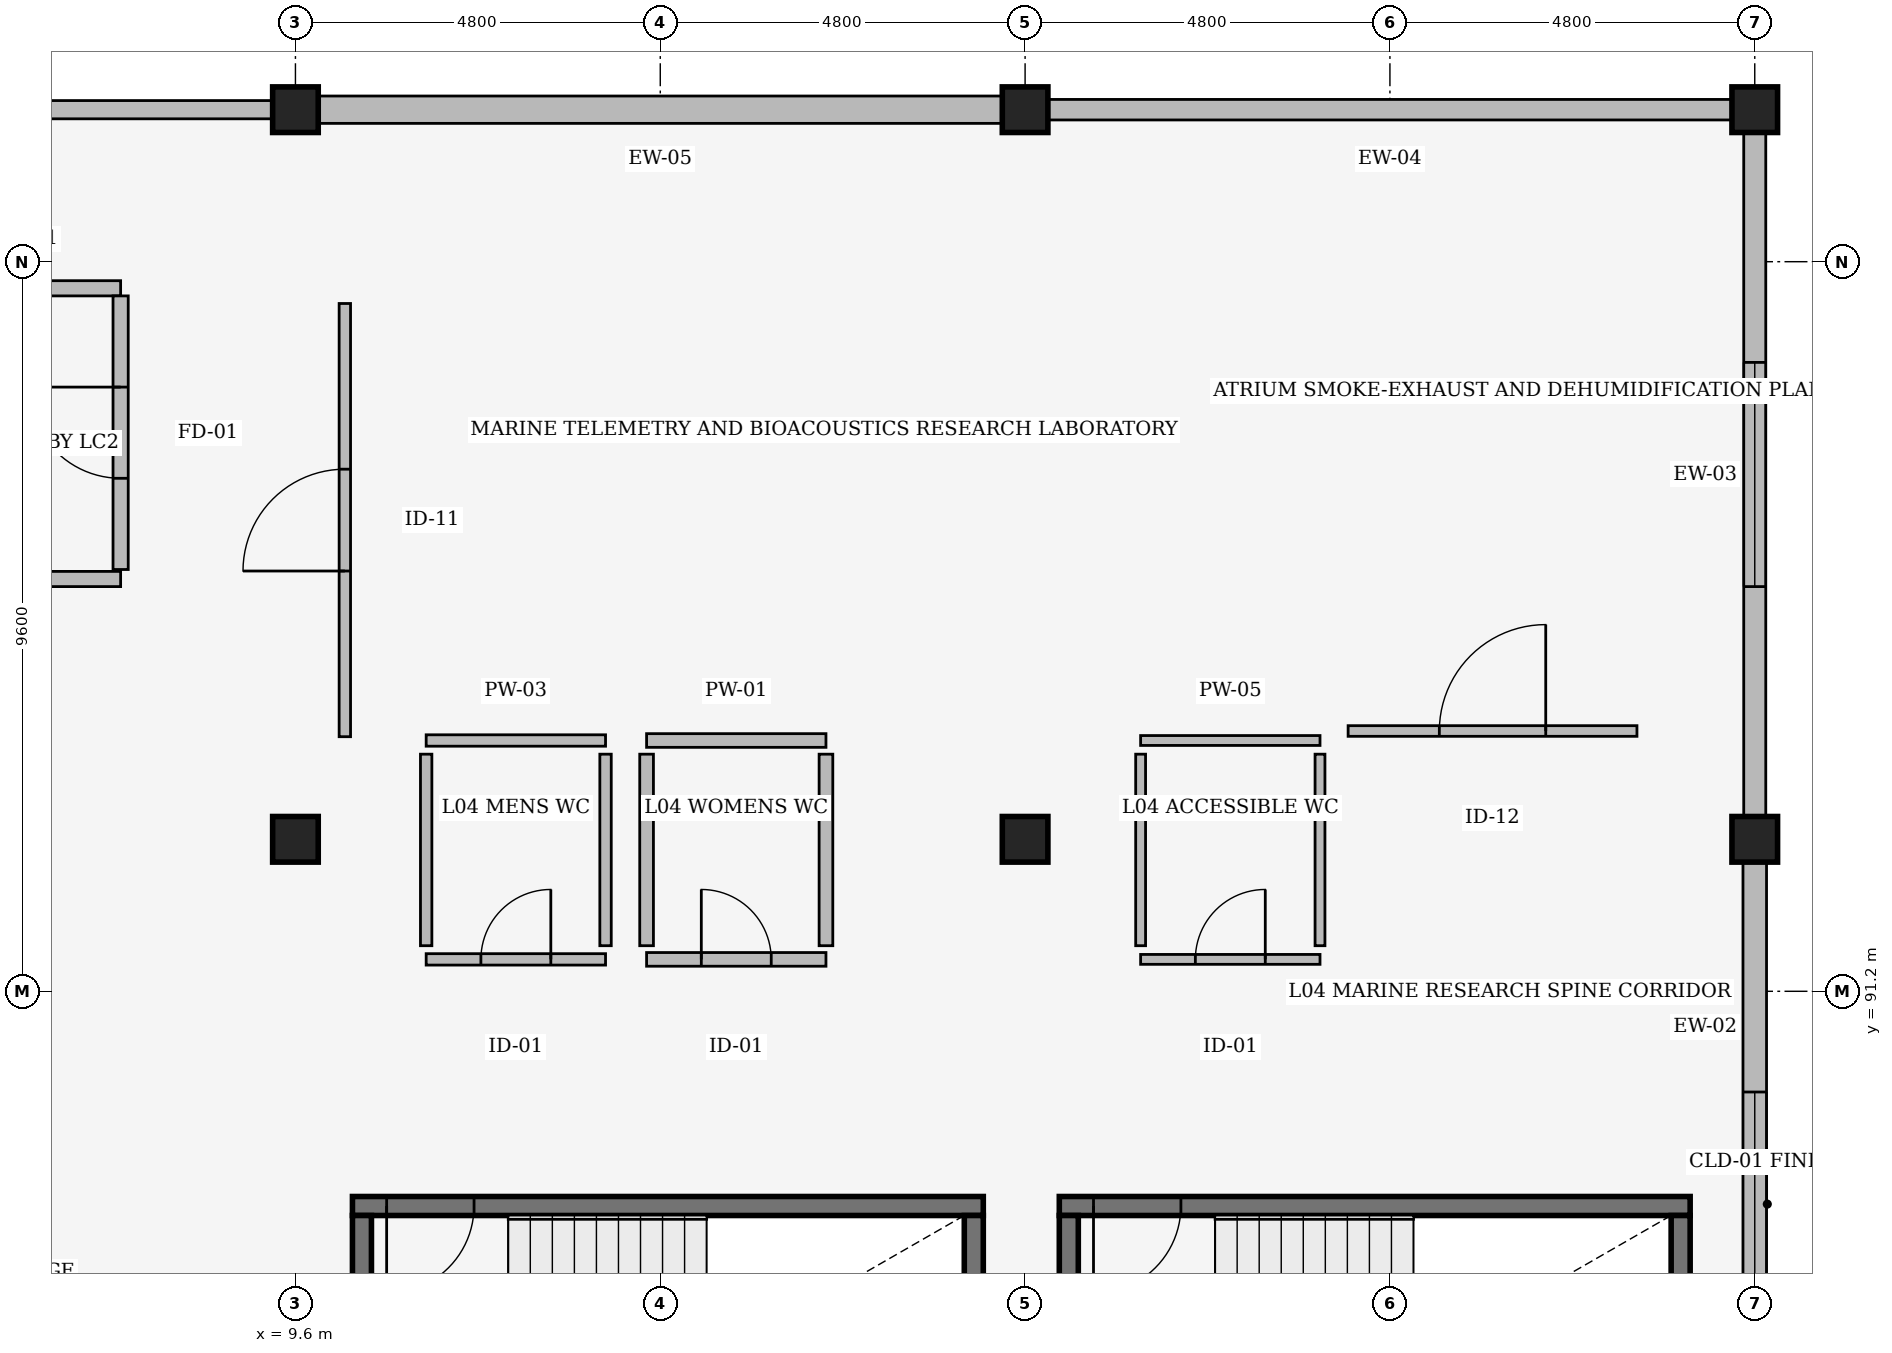
"""IFC4 building model, lengths in metres.
Left out: names, types, materials, properties, quantities, classifications, styles, units other than length and angle.
Written with IfcOpenShell. Run it as: python <this file> out.ifc"""

import sys

from ifc_helpers import new_model, si_unit, direction, frame, frame_2d, origin, origin_2d, place, context, subcontext, project, spatial, rectangle, extrude, element, fill, save


model = new_model("IFC4")
c1 = context("Model", 3, precision=1e-05, world=origin(), true_north=direction((0.0, 1.0)))
c2 = subcontext(c1, "Body", "Model", "MODEL_VIEW")
j1 = project(units=[si_unit("LENGTHUNIT", "METRE"), si_unit("PLANEANGLEUNIT", "RADIAN")], contexts=[c1])
p1 = place(None, origin())
s1 = spatial("IfcSite", under=j1, at=p1, CompositionType="ELEMENT")
p2 = place(p1, origin())
s2 = spatial("IfcBuilding", under=s1, at=p2, CompositionType="ELEMENT")
p3 = place(p2, frame((0.0, 0.0, 19.8)))
s3 = spatial("IfcBuildingStorey", under=s2, at=p3, CompositionType="ELEMENT", Elevation=19.8)
for number, where, z_axis, x_axis in (
    (1, (9.6, 93.2, 0.0), (0.0, 0.0, 1.0), (1.0, 0.0, 0.0)),
    (2, (9.6, 102.8, 0.0), (0.0, 0.0, 1.0), (1.0, 0.0, 0.0)),
    (3, (19.2, 93.2, 0.0), (0.0, 0.0, 1.0), (1.0, 0.0, 0.0)),
    (4, (19.2, 102.8, 0.0), (0.0, 0.0, 1.0), (1.0, 0.0, 0.0)),
    (5, (28.8, 93.2, 0.0), (0.0, 0.0, 1.0), (1.0, 0.0, 0.0)),
    (6, (28.8, 102.8, 0.0), (0.0, 0.0, 1.0), (1.0, 0.0, 0.0)),
):
    element("IfcColumn", number, at=place(p3, frame(where, z_axis=z_axis, x_axis=x_axis)), inside=s3, PredefinedType="COLUMN", context=c2, shape_type="SweptSolid", body=[
        extrude(rectangle(XDim=0.6, YDim=0.6, at=origin_2d()), origin(), (0.0, 0.0, 1.0), 3.6),
    ])
p4 = place(p3, frame((28.8, 83.908, 0.0), z_axis=(0.0, 0.0, 1.0), x_axis=(0.0, 1.0, 0.0)))
e7 = element("IfcWall", 7, at=p4, inside=s3, PredefinedType="SOLIDWALL", context=c2, shape_type="SweptSolid", body=[
    extrude(rectangle(XDim=8.984, YDim=0.31, at=frame_2d((4.492, 0.0))), origin(), (0.0, 0.0, 1.0), 2.674),
])
p5 = place(p4, frame((3.017, 0.0, 0.95)))
e8 = element("IfcOpeningElement", 8, at=p5, cuts=e7, PredefinedType="OPENING", context=c2, shape_type="SweptSolid", body=[
    extrude(rectangle(XDim=2.95, YDim=1.2, at=frame_2d((1.475, 0.6))), frame((0.0, 0.165, 0.0), z_axis=(0.0, -1.0, 0.0), x_axis=(1.0, 0.0, 0.0)), (0.0, 0.0, 1.0), 0.33),
])
p6 = place(p3, frame((28.8, 93.508, 0.0), z_axis=(0.0, 0.0, 1.0), x_axis=(0.0, 1.0, 0.0)))
e9 = element("IfcWall", 9, at=p6, inside=s3, PredefinedType="SOLIDWALL", context=c2, shape_type="SweptSolid", body=[
    extrude(rectangle(XDim=8.984, YDim=0.29, at=frame_2d((4.492, 0.0))), origin(), (0.0, 0.0, 1.0), 2.674),
])
p7 = place(p6, frame((3.017, 0.0, 0.95)))
e10 = element("IfcOpeningElement", 10, at=p7, cuts=e9, PredefinedType="OPENING", context=c2, shape_type="SweptSolid", body=[
    extrude(rectangle(XDim=2.95, YDim=1.5, at=frame_2d((1.475, 0.75))), frame((0.0, 0.155, 0.0), z_axis=(0.0, -1.0, 0.0), x_axis=(1.0, 0.0, 0.0)), (0.0, 0.0, 1.0), 0.31),
])
p8 = place(p3, frame((28.492, 102.8, 0.0), z_axis=(0.0, 0.0, 1.0), x_axis=(-1.0, 0.0, 0.0)))
e11 = element("IfcWall", 11, at=p8, inside=s3, PredefinedType="SOLIDWALL", context=c2, shape_type="SweptSolid", body=[
    extrude(rectangle(XDim=8.984, YDim=0.27, at=frame_2d((4.492, 0.0))), origin(), (0.0, 0.0, 1.0), 2.675),
])
p9 = place(p3, frame((18.892, 102.8, 0.0), z_axis=(0.0, 0.0, 1.0), x_axis=(-1.0, 0.0, 0.0)))
e12 = element("IfcWall", 12, at=p9, inside=s3, PredefinedType="SOLIDWALL", context=c2, shape_type="SweptSolid", body=[
    extrude(rectangle(XDim=8.984, YDim=0.36, at=frame_2d((4.492, 0.0))), origin(), (0.0, 0.0, 1.0), 2.675),
])
p10 = place(p3, frame((9.292, 102.8, 0.0), z_axis=(0.0, 0.0, 1.0), x_axis=(-1.0, 0.0, 0.0)))
e13 = element("IfcWall", 13, at=p10, inside=s3, PredefinedType="SOLIDWALL", context=c2, shape_type="SweptSolid", body=[
    extrude(rectangle(XDim=8.984, YDim=0.24, at=frame_2d((4.492, 0.0))), origin(), (0.0, 0.0, 1.0), 2.978),
])
p11 = place(p10, frame((3.017, 0.0, 0.95)))
e14 = element("IfcOpeningElement", 14, at=p11, cuts=e13, PredefinedType="OPENING", context=c2, shape_type="SweptSolid", body=[
    extrude(rectangle(XDim=2.95, YDim=1.8, at=frame_2d((1.475, 0.9))), frame((0.0, 0.13, 0.0), z_axis=(0.0, -1.0, 0.0), x_axis=(1.0, 0.0, 0.0)), (0.0, 0.0, 1.0), 0.26),
])
p12 = place(p3, frame((18.65, 88.375, 0.0), z_axis=(0.0, 0.0, 1.0), x_axis=(-1.0, 0.0, 0.0)))
e15 = element("IfcWall", 15, at=p12, inside=s3, PredefinedType="SHEAR", context=c2, shape_type="SweptSolid", body=[
    extrude(rectangle(XDim=8.3, YDim=0.25, at=frame_2d((4.15, 0.0))), origin(), (0.0, 0.0, 1.0), 3.32),
])
p13 = place(p12, frame((7.85, 0.0, 0.0), z_axis=(0.0, 0.0, 1.0), x_axis=(-1.0, 0.0, 0.0)))
e16 = element("IfcOpeningElement", 16, at=p13, cuts=e15, PredefinedType="OPENING", context=c2, shape_type="SweptSolid", body=[
    extrude(rectangle(XDim=1.15, YDim=2.2, at=frame_2d((0.575, 1.1))), frame((0.0, 0.135, 0.0), z_axis=(0.0, -1.0, 0.0), x_axis=(1.0, 0.0, 0.0)), (0.0, 0.0, 1.0), 0.27),
])
for number, where, z_axis, x_axis in (
    (17, (10.475, 88.25, 0.0), (0.0, 0.0, 1.0), (0.0, -1.0, 0.0)),
    (18, (18.525, 84.8, 0.0), (0.0, 0.0, 1.0), (0.0, 1.0, 0.0)),
):
    element("IfcWall", number, at=place(p3, frame(where, z_axis=z_axis, x_axis=x_axis)), inside=s3, PredefinedType="SHEAR", context=c2, shape_type="SweptSolid", body=[
        extrude(rectangle(XDim=3.45, YDim=0.25, at=frame_2d((1.725, 0.0))), origin(), (0.0, 0.0, 1.0), 3.32),
    ])
p14 = place(p3, frame((27.95, 88.375, 0.0), z_axis=(0.0, 0.0, 1.0), x_axis=(-1.0, 0.0, 0.0)))
e19 = element("IfcWall", 19, at=p14, inside=s3, PredefinedType="SHEAR", context=c2, shape_type="SweptSolid", body=[
    extrude(rectangle(XDim=8.3, YDim=0.25, at=frame_2d((4.15, 0.0))), origin(), (0.0, 0.0, 1.0), 3.32),
])
p15 = place(p14, frame((7.85, 0.0, 0.0), z_axis=(0.0, 0.0, 1.0), x_axis=(-1.0, 0.0, 0.0)))
e20 = element("IfcOpeningElement", 20, at=p15, cuts=e19, PredefinedType="OPENING", context=c2, shape_type="SweptSolid", body=[
    extrude(rectangle(XDim=1.15, YDim=2.2, at=frame_2d((0.575, 1.1))), frame((0.0, 0.135, 0.0), z_axis=(0.0, -1.0, 0.0), x_axis=(1.0, 0.0, 0.0)), (0.0, 0.0, 1.0), 0.27),
])
for number, where, z_axis, x_axis in (
    (21, (19.775, 88.25, 0.0), (0.0, 0.0, 1.0), (0.0, -1.0, 0.0)),
    (22, (27.825, 84.8, 0.0), (0.0, 0.0, 1.0), (0.0, 1.0, 0.0)),
):
    element("IfcWall", number, at=place(p3, frame(where, z_axis=z_axis, x_axis=x_axis)), inside=s3, PredefinedType="SHEAR", context=c2, shape_type="SweptSolid", body=[
        extrude(rectangle(XDim=3.45, YDim=0.25, at=frame_2d((1.725, 0.0))), origin(), (0.0, 0.0, 1.0), 3.32),
    ])
p16 = place(p3, frame((2.1, 100.45, 0.0), z_axis=(0.0, 0.0, 1.0), x_axis=(1.0, 0.0, 0.0)))
e23 = element("IfcWall", 23, at=p16, inside=s3, PredefinedType="PARTITIONING", context=c2, shape_type="SweptSolid", body=[
    extrude(rectangle(XDim=5.2, YDim=0.2, at=frame_2d((2.6, 0.0))), origin(), (0.0, 0.0, 1.0), 2.976),
])
p17 = place(p16, frame((1.6, 0.0, 0.0)))
e24 = element("IfcOpeningElement", 24, at=p17, cuts=e23, PredefinedType="OPENING", context=c2, shape_type="SweptSolid", body=[
    extrude(rectangle(XDim=1.2, YDim=2.2, at=frame_2d((0.6, 1.1))), frame((0.0, 0.11, 0.0), z_axis=(0.0, -1.0, 0.0), x_axis=(1.0, 0.0, 0.0)), (0.0, 0.0, 1.0), 0.22),
])
p18 = place(p3, frame((7.3, 96.75, 0.0), z_axis=(0.0, 0.0, 1.0), x_axis=(0.0, 1.0, 0.0)))
e25 = element("IfcWall", 25, at=p18, inside=s3, PredefinedType="PARTITIONING", context=c2, shape_type="SweptSolid", body=[
    extrude(rectangle(XDim=3.6, YDim=0.2, at=frame_2d((1.8, 0.0))), origin(), (0.0, 0.0, 1.0), 2.933),
])
p19 = place(p18, frame((1.2, 0.0, 0.0)))
e26 = element("IfcOpeningElement", 26, at=p19, cuts=e25, PredefinedType="OPENING", context=c2, shape_type="SweptSolid", body=[
    extrude(rectangle(XDim=1.2, YDim=2.2, at=frame_2d((0.6, 1.1))), frame((0.0, 0.11, 0.0), z_axis=(0.0, -1.0, 0.0), x_axis=(1.0, 0.0, 0.0)), (0.0, 0.0, 1.0), 0.22),
])
p20 = place(p3, frame((5.25, 96.625, 0.0), z_axis=(0.0, 0.0, 1.0), x_axis=(1.0, 0.0, 0.0)))
e27 = element("IfcWall", 27, at=p20, inside=s3, PredefinedType="PARTITIONING", context=c2, shape_type="SweptSolid", body=[
    extrude(rectangle(XDim=2.05, YDim=0.2, at=frame_2d((1.025, 0.0))), origin(), (0.0, 0.0, 1.0), 3.24),
])
p21 = place(p3, frame((11.32, 94.5, 0.0), z_axis=(0.0, 0.0, 1.0), x_axis=(1.0, 0.0, 0.0)))
e28 = element("IfcWall", 28, at=p21, inside=s3, PredefinedType="PARTITIONING", context=c2, shape_type="SweptSolid", body=[
    extrude(rectangle(XDim=2.36, YDim=0.15, at=frame_2d((1.18, 0.0))), origin(), (0.0, 0.0, 1.0), 3.24),
])
p22 = place(p3, frame((11.32, 91.62, 0.0), z_axis=(0.0, 0.0, 1.0), x_axis=(1.0, 0.0, 0.0)))
e29 = element("IfcWall", 29, at=p22, inside=s3, PredefinedType="PARTITIONING", context=c2, shape_type="SweptSolid", body=[
    extrude(rectangle(XDim=2.36, YDim=0.15, at=frame_2d((1.18, 0.0))), origin(), (0.0, 0.0, 1.0), 3.24),
])
p23 = place(p22, frame((0.72, 0.0, 0.0)))
e30 = element("IfcOpeningElement", 30, at=p23, cuts=e29, PredefinedType="OPENING", context=c2, shape_type="SweptSolid", body=[
    extrude(rectangle(XDim=0.92, YDim=2.12, at=frame_2d((0.46, 1.06))), frame((0.0, 0.085, 0.0), z_axis=(0.0, -1.0, 0.0), x_axis=(1.0, 0.0, 0.0)), (0.0, 0.0, 1.0), 0.17),
])
for number, where, z_axis, x_axis in (
    (31, (11.32, 91.8, 0.0), (0.0, 0.0, 1.0), (0.0, 1.0, 0.0)),
    (32, (13.68, 91.8, 0.0), (0.0, 0.0, 1.0), (0.0, 1.0, 0.0)),
):
    element("IfcWall", number, at=place(p3, frame(where, z_axis=z_axis, x_axis=x_axis)), inside=s3, PredefinedType="PARTITIONING", context=c2, shape_type="SweptSolid", body=[
        extrude(rectangle(XDim=2.52, YDim=0.15, at=frame_2d((1.26, 0.0))), origin(), (0.0, 0.0, 1.0), 2.923),
    ])
p24 = place(p3, frame((14.22, 94.5, 0.0), z_axis=(0.0, 0.0, 1.0), x_axis=(1.0, 0.0, 0.0)))
e33 = element("IfcWall", 33, at=p24, inside=s3, PredefinedType="PARTITIONING", context=c2, shape_type="SweptSolid", body=[
    extrude(rectangle(XDim=2.36, YDim=0.18, at=frame_2d((1.18, 0.0))), origin(), (0.0, 0.0, 1.0), 3.24),
])
p25 = place(p3, frame((14.22, 91.62, 0.0), z_axis=(0.0, 0.0, 1.0), x_axis=(1.0, 0.0, 0.0)))
e34 = element("IfcWall", 34, at=p25, inside=s3, PredefinedType="PARTITIONING", context=c2, shape_type="SweptSolid", body=[
    extrude(rectangle(XDim=2.36, YDim=0.18, at=frame_2d((1.18, 0.0))), origin(), (0.0, 0.0, 1.0), 3.24),
])
p26 = place(p25, frame((0.72, 0.0, 0.0)))
e35 = element("IfcOpeningElement", 35, at=p26, cuts=e34, PredefinedType="OPENING", context=c2, shape_type="SweptSolid", body=[
    extrude(rectangle(XDim=0.92, YDim=2.12, at=frame_2d((0.46, 1.06))), frame((0.0, 0.1, 0.0), z_axis=(0.0, -1.0, 0.0), x_axis=(1.0, 0.0, 0.0)), (0.0, 0.0, 1.0), 0.2),
])
for number, where, z_axis, x_axis in (
    (36, (14.22, 91.8, 0.0), (0.0, 0.0, 1.0), (0.0, 1.0, 0.0)),
    (37, (16.58, 91.8, 0.0), (0.0, 0.0, 1.0), (0.0, 1.0, 0.0)),
):
    element("IfcWall", number, at=place(p3, frame(where, z_axis=z_axis, x_axis=x_axis)), inside=s3, PredefinedType="PARTITIONING", context=c2, shape_type="SweptSolid", body=[
        extrude(rectangle(XDim=2.52, YDim=0.18, at=frame_2d((1.26, 0.0))), origin(), (0.0, 0.0, 1.0), 2.923),
    ])
p27 = place(p3, frame((20.72, 94.5, 0.0), z_axis=(0.0, 0.0, 1.0), x_axis=(1.0, 0.0, 0.0)))
e38 = element("IfcWall", 38, at=p27, inside=s3, PredefinedType="PARTITIONING", context=c2, shape_type="SweptSolid", body=[
    extrude(rectangle(XDim=2.36, YDim=0.13, at=frame_2d((1.18, 0.0))), origin(), (0.0, 0.0, 1.0), 3.24),
])
p28 = place(p3, frame((20.72, 91.62, 0.0), z_axis=(0.0, 0.0, 1.0), x_axis=(1.0, 0.0, 0.0)))
e39 = element("IfcWall", 39, at=p28, inside=s3, PredefinedType="PARTITIONING", context=c2, shape_type="SweptSolid", body=[
    extrude(rectangle(XDim=2.36, YDim=0.13, at=frame_2d((1.18, 0.0))), origin(), (0.0, 0.0, 1.0), 3.24),
])
p29 = place(p28, frame((0.72, 0.0, 0.0)))
e40 = element("IfcOpeningElement", 40, at=p29, cuts=e39, PredefinedType="OPENING", context=c2, shape_type="SweptSolid", body=[
    extrude(rectangle(XDim=0.92, YDim=2.12, at=frame_2d((0.46, 1.06))), frame((0.0, 0.075, 0.0), z_axis=(0.0, -1.0, 0.0), x_axis=(1.0, 0.0, 0.0)), (0.0, 0.0, 1.0), 0.15),
])
for number, where, z_axis, x_axis in (
    (41, (20.72, 91.8, 0.0), (0.0, 0.0, 1.0), (0.0, 1.0, 0.0)),
    (42, (23.08, 91.8, 0.0), (0.0, 0.0, 1.0), (0.0, 1.0, 0.0)),
):
    element("IfcWall", number, at=place(p3, frame(where, z_axis=z_axis, x_axis=x_axis)), inside=s3, PredefinedType="PARTITIONING", context=c2, shape_type="SweptSolid", body=[
        extrude(rectangle(XDim=2.52, YDim=0.13, at=frame_2d((1.26, 0.0))), origin(), (0.0, 0.0, 1.0), 2.674),
    ])
p30 = place(p3, frame((10.25, 94.55, 0.0), z_axis=(0.0, 0.0, 1.0), x_axis=(0.0, 1.0, 0.0)))
e43 = element("IfcWall", 43, at=p30, inside=s3, PredefinedType="PARTITIONING", context=c2, shape_type="SweptSolid", body=[
    extrude(rectangle(XDim=5.7, YDim=0.15, at=frame_2d((2.85, 0.0))), origin(), (0.0, 0.0, 1.0), 2.869),
])
p31 = place(p30, frame((2.18, 0.0, 0.0)))
e44 = element("IfcOpeningElement", 44, at=p31, cuts=e43, PredefinedType="OPENING", context=c2, shape_type="SweptSolid", body=[
    extrude(rectangle(XDim=1.34, YDim=2.28, at=frame_2d((0.67, 1.14))), frame((0.0, 0.085, 0.0), z_axis=(0.0, -1.0, 0.0), x_axis=(1.0, 0.0, 0.0)), (0.0, 0.0, 1.0), 0.17),
])
p32 = place(p3, frame((23.45, 94.625, 0.0), z_axis=(0.0, 0.0, 1.0), x_axis=(1.0, 0.0, 0.0)))
e45 = element("IfcWall", 45, at=p32, inside=s3, PredefinedType="PARTITIONING", context=c2, shape_type="SweptSolid", body=[
    extrude(rectangle(XDim=3.8, YDim=0.14, at=frame_2d((1.9, 0.0))), origin(), (0.0, 0.0, 1.0), 3.24),
])
p33 = place(p32, frame((1.2, 0.0, 0.0)))
e46 = element("IfcOpeningElement", 46, at=p33, cuts=e45, PredefinedType="OPENING", context=c2, shape_type="SweptSolid", body=[
    extrude(rectangle(XDim=1.4, YDim=2.3, at=frame_2d((0.7, 1.15))), frame((0.0, 0.08, 0.0), z_axis=(0.0, -1.0, 0.0), x_axis=(1.0, 0.0, 0.0)), (0.0, 0.0, 1.0), 0.16),
])
p34 = place(p5, origin())
e47 = element("IfcWindow", 47, at=p34, inside=s3, PartitioningType="SINGLE_PANEL", PredefinedType="WINDOW", context=c2, shape_type="SweptSolid", body=[
    extrude(rectangle(XDim=2.95, YDim=1.2, at=frame_2d((1.475, 0.6))), frame((0.0, 0.03, 0.0), z_axis=(0.0, -1.0, 0.0), x_axis=(1.0, 0.0, 0.0)), (0.0, 0.0, 1.0), 0.06),
])
fill(e8, e47)
p35 = place(p7, origin())
e48 = element("IfcWindow", 48, at=p35, inside=s3, PartitioningType="SINGLE_PANEL", PredefinedType="WINDOW", context=c2, shape_type="SweptSolid", body=[
    extrude(rectangle(XDim=2.95, YDim=1.5, at=frame_2d((1.475, 0.75))), frame((0.0, 0.03, 0.0), z_axis=(0.0, -1.0, 0.0), x_axis=(1.0, 0.0, 0.0)), (0.0, 0.0, 1.0), 0.06),
])
fill(e10, e48)
p36 = place(p13, origin())
e49 = element("IfcDoor", 49, at=p36, inside=s3, OperationType="SINGLE_SWING_LEFT", PredefinedType="DOOR", context=c2, shape_type="SweptSolid", body=[
    extrude(rectangle(XDim=1.15, YDim=2.2, at=frame_2d((0.575, 1.1))), frame((0.0, 0.025, 0.0), z_axis=(0.0, -1.0, 0.0), x_axis=(1.0, 0.0, 0.0)), (0.0, 0.0, 1.0), 0.05),
])
fill(e16, e49)
p37 = place(p15, origin())
e50 = element("IfcDoor", 50, at=p37, inside=s3, OperationType="SINGLE_SWING_LEFT", PredefinedType="DOOR", context=c2, shape_type="SweptSolid", body=[
    extrude(rectangle(XDim=1.15, YDim=2.2, at=frame_2d((0.575, 1.1))), frame((0.0, 0.025, 0.0), z_axis=(0.0, -1.0, 0.0), x_axis=(1.0, 0.0, 0.0)), (0.0, 0.0, 1.0), 0.05),
])
fill(e20, e50)
p38 = place(p19, origin())
e51 = element("IfcDoor", 51, at=p38, inside=s3, OperationType="SINGLE_SWING_RIGHT", PredefinedType="DOOR", context=c2, shape_type="SweptSolid", body=[
    extrude(rectangle(XDim=1.2, YDim=2.2, at=frame_2d((0.6, 1.1))), frame((0.0, 0.025, 0.0), z_axis=(0.0, -1.0, 0.0), x_axis=(1.0, 0.0, 0.0)), (0.0, 0.0, 1.0), 0.05),
])
fill(e26, e51)
p39 = place(p23, origin())
e52 = element("IfcDoor", 52, at=p39, inside=s3, OperationType="SINGLE_SWING_RIGHT", PredefinedType="DOOR", context=c2, shape_type="SweptSolid", body=[
    extrude(rectangle(XDim=0.92, YDim=2.12, at=frame_2d((0.46, 1.06))), frame((0.0, 0.025, 0.0), z_axis=(0.0, -1.0, 0.0), x_axis=(1.0, 0.0, 0.0)), (0.0, 0.0, 1.0), 0.05),
])
fill(e30, e52)
p40 = place(p26, origin())
e53 = element("IfcDoor", 53, at=p40, inside=s3, OperationType="SINGLE_SWING_LEFT", PredefinedType="DOOR", context=c2, shape_type="SweptSolid", body=[
    extrude(rectangle(XDim=0.92, YDim=2.12, at=frame_2d((0.46, 1.06))), frame((0.0, 0.025, 0.0), z_axis=(0.0, -1.0, 0.0), x_axis=(1.0, 0.0, 0.0)), (0.0, 0.0, 1.0), 0.05),
])
fill(e35, e53)
p41 = place(p29, origin())
e54 = element("IfcDoor", 54, at=p41, inside=s3, OperationType="SINGLE_SWING_RIGHT", PredefinedType="DOOR", context=c2, shape_type="SweptSolid", body=[
    extrude(rectangle(XDim=0.92, YDim=2.12, at=frame_2d((0.46, 1.06))), frame((0.0, 0.025, 0.0), z_axis=(0.0, -1.0, 0.0), x_axis=(1.0, 0.0, 0.0)), (0.0, 0.0, 1.0), 0.05),
])
fill(e40, e54)
p42 = place(p31, origin())
e55 = element("IfcDoor", 55, at=p42, inside=s3, OperationType="SINGLE_SWING_LEFT", PredefinedType="DOOR", context=c2, shape_type="SweptSolid", body=[
    extrude(rectangle(XDim=1.34, YDim=2.28, at=frame_2d((0.67, 1.14))), frame((0.0, 0.025, 0.0), z_axis=(0.0, -1.0, 0.0), x_axis=(1.0, 0.0, 0.0)), (0.0, 0.0, 1.0), 0.05),
])
fill(e44, e55)
p43 = place(p33, origin())
e56 = element("IfcDoor", 56, at=p43, inside=s3, OperationType="SINGLE_SWING_RIGHT", PredefinedType="DOOR", context=c2, shape_type="SweptSolid", body=[
    extrude(rectangle(XDim=1.4, YDim=2.3, at=frame_2d((0.7, 1.15))), frame((0.0, 0.025, 0.0), z_axis=(0.0, -1.0, 0.0), x_axis=(1.0, 0.0, 0.0)), (0.0, 0.0, 1.0), 0.05),
])
fill(e46, e56)
save(model, sys.argv[1])
